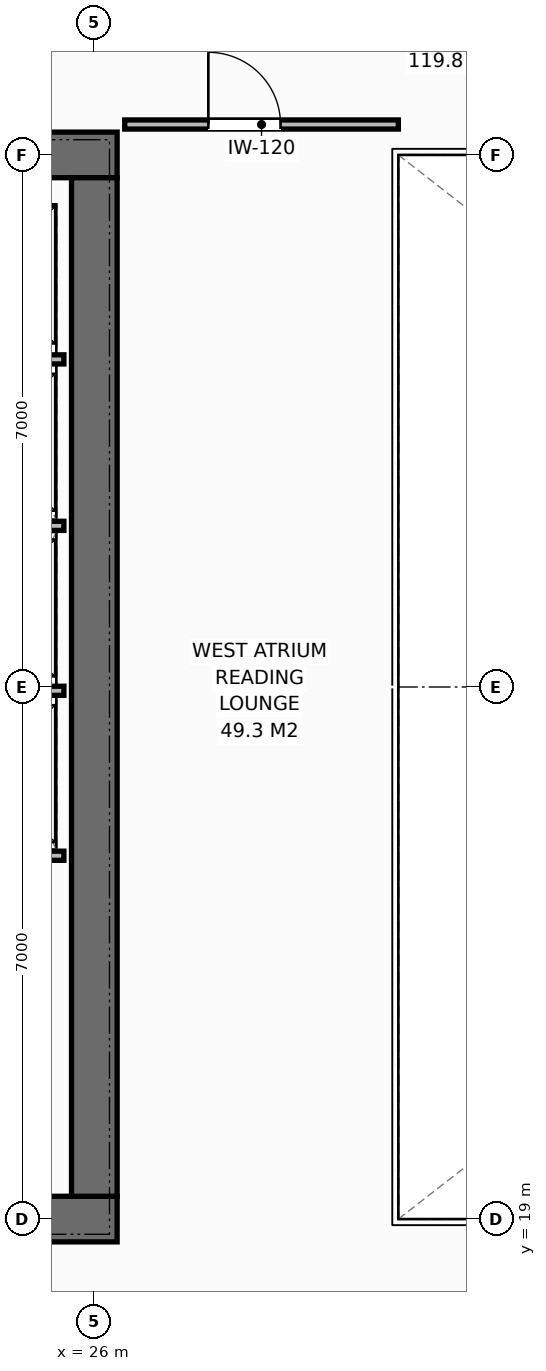
"""IFC4 building model, lengths in metres.
Left out: names, types, materials, properties, quantities, classifications, styles, units other than length and angle.
Written with IfcOpenShell. Run it as: python <this file> out.ifc"""

import sys

from ifc_helpers import new_model, si_unit, direction, frame, frame_2d, origin, place, context, subcontext, project, spatial, rectangle, extrude, element, fill, save


model = new_model("IFC4")
c1 = context("Model", 3, precision=1e-05, world=origin(), true_north=direction((0.0, 1.0)))
c2 = subcontext(c1, "Body", "Model", "MODEL_VIEW")
j1 = project(units=[si_unit("LENGTHUNIT", "METRE"), si_unit("PLANEANGLEUNIT", "RADIAN")], contexts=[c1])
p1 = place(None, origin())
s1 = spatial("IfcSite", under=j1, at=p1, CompositionType="ELEMENT")
p2 = place(p1, origin())
s2 = spatial("IfcBuilding", under=s1, at=p2, CompositionType="ELEMENT")
p3 = place(p2, frame((0.0, 0.0, 144.2)))
s3 = spatial("IfcBuildingStorey", under=s2, at=p3, CompositionType="ELEMENT", Elevation=144.2)
p4 = place(p3, frame((12.7, 19.0, 0.0), z_axis=(0.0, 0.0, 1.0), x_axis=(1.0, 0.0, 0.0)))
e1 = element("IfcWall", 1, at=p4, inside=s3, PredefinedType="SHEAR", context=c2, shape_type="SweptSolid", body=[
    extrude(rectangle(XDim=13.6, YDim=0.6, at=frame_2d((6.8, 0.0))), origin(), (0.0, 0.0, 1.0), 3.8),
])
p5 = place(p4, frame((9.18, 0.0, 0.0)))
e2 = element("IfcOpeningElement", 2, at=p5, cuts=e1, PredefinedType="OPENING", context=c2, shape_type="SweptSolid", body=[
    extrude(rectangle(XDim=1.4, YDim=2.2, at=frame_2d((0.7, 1.1))), frame((0.0, 0.31, 0.0), z_axis=(0.0, -1.0, 0.0), x_axis=(1.0, 0.0, 0.0)), (0.0, 0.0, 1.0), 0.62),
])
p6 = place(p3, frame((12.7, 33.0, 0.0), z_axis=(0.0, 0.0, 1.0), x_axis=(1.0, 0.0, 0.0)))
e3 = element("IfcWall", 3, at=p6, inside=s3, PredefinedType="SHEAR", context=c2, shape_type="SweptSolid", body=[
    extrude(rectangle(XDim=13.6, YDim=0.6, at=frame_2d((6.8, 0.0))), origin(), (0.0, 0.0, 1.0), 3.8),
])
p7 = place(p6, frame((1.2, 0.0, 0.0)))
e4 = element("IfcOpeningElement", 4, at=p7, cuts=e3, PredefinedType="OPENING", context=c2, shape_type="SweptSolid", body=[
    extrude(rectangle(XDim=0.9, YDim=2.15, at=frame_2d((0.45, 1.075))), frame((0.0, 0.31, 0.0), z_axis=(0.0, -1.0, 0.0), x_axis=(1.0, 0.0, 0.0)), (0.0, 0.0, 1.0), 0.62),
])
p8 = place(p6, frame((3.1, 0.0, 0.0)))
e5 = element("IfcOpeningElement", 5, at=p8, cuts=e3, PredefinedType="OPENING", context=c2, shape_type="SweptSolid", body=[
    extrude(rectangle(XDim=0.9, YDim=2.15, at=frame_2d((0.45, 1.075))), frame((0.0, 0.31, 0.0), z_axis=(0.0, -1.0, 0.0), x_axis=(1.0, 0.0, 0.0)), (0.0, 0.0, 1.0), 0.62),
])
p9 = place(p6, frame((4.9, 0.0, 0.0)))
e6 = element("IfcOpeningElement", 6, at=p9, cuts=e3, PredefinedType="OPENING", context=c2, shape_type="SweptSolid", body=[
    extrude(rectangle(XDim=0.9, YDim=2.15, at=frame_2d((0.45, 1.075))), frame((0.0, 0.31, 0.0), z_axis=(0.0, -1.0, 0.0), x_axis=(1.0, 0.0, 0.0)), (0.0, 0.0, 1.0), 0.62),
])
p10 = place(p6, frame((6.8, 0.0, 0.0)))
e7 = element("IfcOpeningElement", 7, at=p10, cuts=e3, PredefinedType="OPENING", context=c2, shape_type="SweptSolid", body=[
    extrude(rectangle(XDim=0.9, YDim=2.15, at=frame_2d((0.45, 1.075))), frame((0.0, 0.31, 0.0), z_axis=(0.0, -1.0, 0.0), x_axis=(1.0, 0.0, 0.0)), (0.0, 0.0, 1.0), 0.62),
])
p11 = place(p6, frame((9.18, 0.0, 0.0)))
e8 = element("IfcOpeningElement", 8, at=p11, cuts=e3, PredefinedType="OPENING", context=c2, shape_type="SweptSolid", body=[
    extrude(rectangle(XDim=1.4, YDim=2.2, at=frame_2d((0.7, 1.1))), frame((0.0, 0.31, 0.0), z_axis=(0.0, -1.0, 0.0), x_axis=(1.0, 0.0, 0.0)), (0.0, 0.0, 1.0), 0.62),
])
p12 = place(p3, frame((26.0, 19.3, 0.0), z_axis=(0.0, 0.0, 1.0), x_axis=(0.0, 1.0, 0.0)))
e9 = element("IfcWall", 9, at=p12, inside=s3, PredefinedType="SHEAR", context=c2, shape_type="SweptSolid", body=[
    extrude(rectangle(XDim=13.4, YDim=0.6, at=frame_2d((6.7, 0.0))), origin(), (0.0, 0.0, 1.0), 3.8),
])
for number, where, z_axis, x_axis in (
    (10, (23.4, 23.78, 0.0), (0.0, 0.0, 1.0), (1.0, 0.0, 0.0)),
    (11, (23.4, 25.95, 0.0), (0.0, 0.0, 1.0), (1.0, 0.0, 0.0)),
    (12, (23.4, 28.12, 0.0), (0.0, 0.0, 1.0), (1.0, 0.0, 0.0)),
    (13, (23.4, 30.31, 0.0), (0.0, 0.0, 1.0), (1.0, 0.0, 0.0)),
):
    element("IfcWall", number, at=place(p3, frame(where, z_axis=z_axis, x_axis=x_axis)), inside=s3, PredefinedType="PARTITIONING", context=c2, shape_type="SweptSolid", body=[
        extrude(rectangle(XDim=2.2, YDim=0.12, at=frame_2d((1.1, 0.0))), origin(), (0.0, 0.0, 1.0), 3.572),
    ])
p13 = place(p3, frame((26.4, 33.4, 0.0), z_axis=(0.0, 0.0, 1.0), x_axis=(1.0, 0.0, 0.0)))
e14 = element("IfcWall", 14, at=p13, inside=s3, PredefinedType="PARTITIONING", context=c2, shape_type="SweptSolid", body=[
    extrude(rectangle(XDim=3.6, YDim=0.12, at=frame_2d((1.8, 0.0))), origin(), (0.0, 0.0, 1.0), 3.572),
])
p14 = place(p13, frame((1.1, 0.0, 0.0)))
e15 = element("IfcOpeningElement", 15, at=p14, cuts=e14, PredefinedType="OPENING", context=c2, shape_type="SweptSolid", body=[
    extrude(rectangle(XDim=0.95, YDim=2.15, at=frame_2d((0.475, 1.075))), frame((0.0, 0.07, 0.0), z_axis=(0.0, -1.0, 0.0), x_axis=(1.0, 0.0, 0.0)), (0.0, 0.0, 1.0), 0.14),
])
p15 = place(p14, origin())
e16 = element("IfcDoor", 16, at=p15, inside=s3, OperationType="SINGLE_SWING_LEFT", PredefinedType="DOOR", context=c2, shape_type="SweptSolid", body=[
    extrude(rectangle(XDim=0.95, YDim=2.15, at=frame_2d((0.475, 1.075))), frame((0.0, 0.025, 0.0), z_axis=(0.0, -1.0, 0.0), x_axis=(1.0, 0.0, 0.0)), (0.0, 0.0, 1.0), 0.05),
])
fill(e15, e16)
save(model, sys.argv[1])
